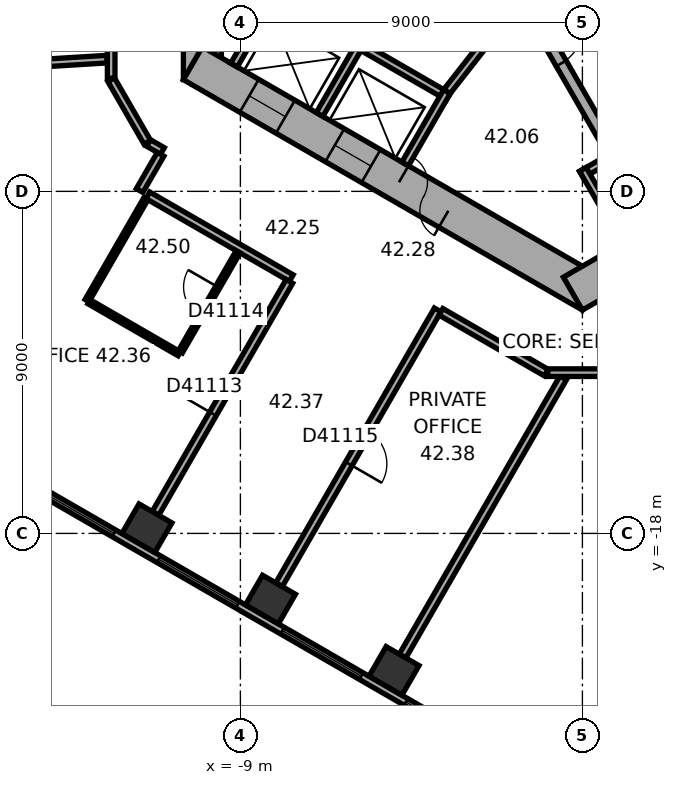
"""IFC4 building model, lengths in metres.
Left out: names, types, materials, properties, quantities, classifications, styles, units other than length and angle.
Written with IfcOpenShell. Run it as: python <this file> out.ifc"""

import sys

from ifc_helpers import new_model, si_unit, direction, frame, frame_2d, origin, origin_2d, place, context, subcontext, project, spatial, rectangle, extrude, element, fill, save


model = new_model("IFC4")
c1 = context("Model", 3, precision=1e-05, world=origin(), true_north=direction((0.0, 1.0)))
c2 = subcontext(c1, "Body", "Model", "MODEL_VIEW")
j1 = project(units=[si_unit("LENGTHUNIT", "METRE"), si_unit("PLANEANGLEUNIT", "RADIAN")], contexts=[c1])
p1 = place(None, origin())
s1 = spatial("IfcSite", under=j1, at=p1, CompositionType="ELEMENT")
p2 = place(p1, origin())
s2 = spatial("IfcBuilding", under=s1, at=p2, CompositionType="ELEMENT")
p3 = place(p2, frame((0.0, 0.0, 172.5)))
s3 = spatial("IfcBuildingStorey", under=s2, at=p3, CompositionType="ELEMENT", Elevation=172.5)
for number, where, z_axis, x_axis in (
    (1, (-11.46, -17.863, 0.0), (0.0, 0.0, 1.0), (0.866, -0.5, 0.0)),
    (2, (-8.208, -19.74, 0.0), (0.0, 0.0, 1.0), (0.866, -0.5, 0.0)),
    (3, (-4.958, -21.617, 0.0), (0.0, 0.0, 1.0), (0.866, -0.5, 0.0)),
):
    element("IfcColumn", number, at=place(p3, frame(where, z_axis=z_axis, x_axis=x_axis)), inside=s3, PredefinedType="COLUMN", context=c2, shape_type="SweptSolid", body=[
        extrude(rectangle(XDim=1.0, YDim=0.9, at=origin_2d()), origin(), (0.0, 0.0, 1.0), 3.7),
    ])
p4 = place(p3, frame((-10.0, 6.062, 0.0), z_axis=(0.0, 0.0, 1.0), x_axis=(0.0, -1.0, 0.0)))
e4 = element("IfcWall", 4, at=p4, inside=s3, PredefinedType="SHEAR", context=c2, shape_type="SweptSolid", body=[
    extrude(rectangle(XDim=12.125, YDim=1.0, at=frame_2d((6.062, 0.0))), origin(), (0.0, 0.0, 1.0), 3.7),
])
p5 = place(p4, frame((5.212, 0.0, 0.0)))
e5 = element("IfcOpeningElement", 5, at=p5, cuts=e4, PredefinedType="OPENING", context=c2, shape_type="SweptSolid", body=[
    extrude(rectangle(XDim=1.1, YDim=2.1, at=frame_2d((0.55, 1.05))), frame((0.0, 0.51, 0.0), z_axis=(0.0, -1.0, 0.0), x_axis=(1.0, 0.0, 0.0)), (0.0, 0.0, 1.0), 1.02),
])
p6 = place(p4, frame((7.812, 0.0, 0.0)))
e6 = element("IfcOpeningElement", 6, at=p6, cuts=e4, PredefinedType="OPENING", context=c2, shape_type="SweptSolid", body=[
    extrude(rectangle(XDim=1.1, YDim=2.1, at=frame_2d((0.55, 1.05))), frame((0.0, 0.51, 0.0), z_axis=(0.0, -1.0, 0.0), x_axis=(1.0, 0.0, 0.0)), (0.0, 0.0, 1.0), 1.02),
])
p7 = place(p3, frame((-10.25, -5.629, 0.0), z_axis=(0.0, 0.0, 1.0), x_axis=(0.866022616891, -0.50000482701, 0.0)))
e7 = element("IfcWall", 7, at=p7, inside=s3, PredefinedType="SHEAR", context=c2, shape_type="SweptSolid", body=[
    extrude(rectangle(XDim=12.125, YDim=1.0, at=frame_2d((6.062, 0.0))), origin(), (0.0, 0.0, 1.0), 3.7),
])
p8 = place(p7, frame((6.262, 0.0, 0.0)))
e8 = element("IfcOpeningElement", 8, at=p8, cuts=e7, PredefinedType="OPENING", context=c2, shape_type="SweptSolid", body=[
    extrude(rectangle(XDim=1.5, YDim=2.1, at=frame_2d((0.75, 1.05))), frame((0.0, 0.51, 0.0), z_axis=(0.0, -1.0, 0.0), x_axis=(1.0, 0.0, 0.0)), (0.0, 0.0, 1.0), 1.02),
])
p9 = place(p7, frame((1.712, 0.0, 0.0)))
e9 = element("IfcOpeningElement", 9, at=p9, cuts=e7, PredefinedType="OPENING", context=c2, shape_type="SweptSolid", body=[
    extrude(rectangle(XDim=1.1, YDim=2.1, at=frame_2d((0.55, 1.05))), frame((0.0, 0.51, 0.0), z_axis=(0.0, -1.0, 0.0), x_axis=(1.0, 0.0, 0.0)), (0.0, 0.0, 1.0), 1.02),
])
p10 = place(p7, frame((4.312, 0.0, 0.0)))
e10 = element("IfcOpeningElement", 10, at=p10, cuts=e7, PredefinedType="OPENING", context=c2, shape_type="SweptSolid", body=[
    extrude(rectangle(XDim=1.1, YDim=2.1, at=frame_2d((0.55, 1.05))), frame((0.0, 0.51, 0.0), z_axis=(0.0, -1.0, 0.0), x_axis=(1.0, 0.0, 0.0)), (0.0, 0.0, 1.0), 1.02),
])
p11 = place(p3, frame((-0.25, -11.691, 0.0), z_axis=(0.0, 0.0, 1.0), x_axis=(0.866022616891, 0.50000482701, 0.0)))
e11 = element("IfcWall", 11, at=p11, inside=s3, PredefinedType="SHEAR", context=c2, shape_type="SweptSolid", body=[
    extrude(rectangle(XDim=12.125, YDim=1.0, at=frame_2d((6.062, 0.0))), origin(), (0.0, 0.0, 1.0), 3.7),
])
p12 = place(p11, frame((2.612, 0.0, 0.0)))
e12 = element("IfcOpeningElement", 12, at=p12, cuts=e11, PredefinedType="OPENING", context=c2, shape_type="SweptSolid", body=[
    extrude(rectangle(XDim=1.1, YDim=2.1, at=frame_2d((0.55, 1.05))), frame((0.0, 0.51, 0.0), z_axis=(0.0, -1.0, 0.0), x_axis=(1.0, 0.0, 0.0)), (0.0, 0.0, 1.0), 1.02),
])
p13 = place(p11, frame((5.212, 0.0, 0.0)))
e13 = element("IfcOpeningElement", 13, at=p13, cuts=e11, PredefinedType="OPENING", context=c2, shape_type="SweptSolid", body=[
    extrude(rectangle(XDim=1.1, YDim=2.1, at=frame_2d((0.55, 1.05))), frame((0.0, 0.51, 0.0), z_axis=(0.0, -1.0, 0.0), x_axis=(1.0, 0.0, 0.0)), (0.0, 0.0, 1.0), 1.02),
])
p14 = place(p11, frame((7.812, 0.0, 0.0)))
e14 = element("IfcOpeningElement", 14, at=p14, cuts=e11, PredefinedType="OPENING", context=c2, shape_type="SweptSolid", body=[
    extrude(rectangle(XDim=1.1, YDim=2.1, at=frame_2d((0.55, 1.05))), frame((0.0, 0.51, 0.0), z_axis=(0.0, -1.0, 0.0), x_axis=(1.0, 0.0, 0.0)), (0.0, 0.0, 1.0), 1.02),
])
p15 = place(p3, frame((-18.789, -14.267, 0.0), z_axis=(0.0, 0.0, 1.0), x_axis=(0.866023315909, -0.500003616288, 0.0)))
e15 = element("IfcWall", 15, at=p15, inside=s3, PredefinedType="STANDARD", context=c2, shape_type="SweptSolid", body=[
    extrude(rectangle(XDim=20.044, YDim=0.2, at=frame_2d((10.022, 0.0))), origin(), (0.0, 0.0, 1.0), 3.7),
])
p16 = place(p15, frame((1.314, 0.0, 0.9)))
e16 = element("IfcOpeningElement", 16, at=p16, cuts=e15, PredefinedType="OPENING", context=c2, shape_type="SweptSolid", body=[
    extrude(rectangle(XDim=2.4, YDim=2.0, at=frame_2d((1.2, 1.0))), frame((0.0, 0.11, 0.0), z_axis=(0.0, -1.0, 0.0), x_axis=(1.0, 0.0, 0.0)), (0.0, 0.0, 1.0), 0.22),
])
p17 = place(p15, frame((5.069, 0.0, 0.9)))
e17 = element("IfcOpeningElement", 17, at=p17, cuts=e15, PredefinedType="OPENING", context=c2, shape_type="SweptSolid", body=[
    extrude(rectangle(XDim=2.4, YDim=2.0, at=frame_2d((1.2, 1.0))), frame((0.0, 0.11, 0.0), z_axis=(0.0, -1.0, 0.0), x_axis=(1.0, 0.0, 0.0)), (0.0, 0.0, 1.0), 0.22),
])
p18 = place(p15, frame((8.823, 0.0, 0.9)))
e18 = element("IfcOpeningElement", 18, at=p18, cuts=e15, PredefinedType="OPENING", context=c2, shape_type="SweptSolid", body=[
    extrude(rectangle(XDim=2.4, YDim=2.0, at=frame_2d((1.2, 1.0))), frame((0.0, 0.11, 0.0), z_axis=(0.0, -1.0, 0.0), x_axis=(1.0, 0.0, 0.0)), (0.0, 0.0, 1.0), 0.22),
])
p19 = place(p15, frame((12.577, 0.0, 0.9)))
e19 = element("IfcOpeningElement", 19, at=p19, cuts=e15, PredefinedType="OPENING", context=c2, shape_type="SweptSolid", body=[
    extrude(rectangle(XDim=2.4, YDim=2.0, at=frame_2d((1.2, 1.0))), frame((0.0, 0.11, 0.0), z_axis=(0.0, -1.0, 0.0), x_axis=(1.0, 0.0, 0.0)), (0.0, 0.0, 1.0), 0.22),
])
p20 = place(p15, frame((16.331, 0.0, 0.9)))
e20 = element("IfcOpeningElement", 20, at=p20, cuts=e15, PredefinedType="OPENING", context=c2, shape_type="SweptSolid", body=[
    extrude(rectangle(XDim=2.4, YDim=2.0, at=frame_2d((1.2, 1.0))), frame((0.0, 0.11, 0.0), z_axis=(0.0, -1.0, 0.0), x_axis=(1.0, 0.0, 0.0)), (0.0, 0.0, 1.0), 0.22),
])
p21 = place(p3, frame((-8.203, -3.809, 0.0), z_axis=(0.0, 0.0, 1.0), x_axis=(0.866028230842, -0.499995103361, 0.0)))
e21 = element("IfcWall", 21, at=p21, inside=s3, PredefinedType="PARTITIONING", context=c2, shape_type="SweptSolid", body=[
    extrude(rectangle(XDim=5.4, YDim=0.2, at=frame_2d((2.7, 0.0))), origin(), (0.0, 0.0, 1.0), 3.42),
])
for number, where, z_axis, x_axis in (
    (22, (-8.067, -3.772, 0.0), (0.0, 0.0, 1.0), (-0.5, -0.866, 0.0)),
    (23, (-5.815, -5.072, 0.0), (0.0, 0.0, 1.0), (-0.5, -0.866, 0.0)),
):
    element("IfcWall", number, at=place(p3, frame(where, z_axis=z_axis, x_axis=x_axis)), inside=s3, PredefinedType="PARTITIONING", context=c2, shape_type="SweptSolid", body=[
        extrude(rectangle(XDim=2.2, YDim=0.2, at=frame_2d((1.1, 0.0))), origin(), (0.0, 0.0, 1.0), 3.42),
    ])
p22 = place(p3, frame((-3.563, -6.372, 0.0), z_axis=(0.0, 0.0, 1.0), x_axis=(-0.499994660107, -0.866028486751, 0.0)))
e24 = element("IfcWall", 24, at=p22, inside=s3, PredefinedType="PARTITIONING", context=c2, shape_type="SweptSolid", body=[
    extrude(rectangle(XDim=2.2, YDim=0.2, at=frame_2d((1.1, 0.0))), origin(), (0.0, 0.0, 1.0), 3.42),
])
p23 = place(p3, frame((-0.024, -8.559, 0.0), z_axis=(0.0, 0.0, 1.0), x_axis=(0.866026010844, 0.49999894854, 0.0)))
e25 = element("IfcWall", 25, at=p23, inside=s3, PredefinedType="PARTITIONING", context=c2, shape_type="SweptSolid", body=[
    extrude(rectangle(XDim=8.0, YDim=0.2, at=frame_2d((4.0, 0.0))), origin(), (0.0, 0.0, 1.0), 3.42),
])
p24 = place(p3, frame((0.013, -8.422, 0.0), z_axis=(0.0, 0.0, 1.0), x_axis=(0.500077893725, -0.86598042715, 0.0)))
e26 = element("IfcWall", 26, at=p24, inside=s3, PredefinedType="PARTITIONING", context=c2, shape_type="SweptSolid", body=[
    extrude(rectangle(XDim=2.2, YDim=0.2, at=frame_2d((1.1, 0.0))), origin(), (0.0, 0.0, 1.0), 3.42),
])
p25 = place(p3, frame((-1.558, -3.902, 0.0), z_axis=(0.0, 0.0, 1.0), x_axis=(0.499977259774, -0.866038532462, 0.0)))
e27 = element("IfcWall", 27, at=p25, inside=s3, PredefinedType="SHEAR", context=c2, shape_type="SweptSolid", body=[
    extrude(rectangle(XDim=4.7, YDim=0.3, at=frame_2d((2.35, 0.0))), origin(), (0.0, 0.0, 1.0), 3.42),
])
p26 = place(p25, frame((0.8, 0.0, 0.0)))
e28 = element("IfcOpeningElement", 28, at=p26, cuts=e27, PredefinedType="OPENING", context=c2, shape_type="SweptSolid", body=[
    extrude(rectangle(XDim=1.2, YDim=2.1, at=frame_2d((0.6, 1.05))), frame((0.0, 0.16, 0.0), z_axis=(0.0, -1.0, 0.0), x_axis=(1.0, 0.0, 0.0)), (0.0, 0.0, 1.0), 0.32),
])
p27 = place(p3, frame((-1.712, -4.008, 0.0), z_axis=(0.0, 0.0, 1.0), x_axis=(-0.616549420702, -0.787316208287, 0.0)))
e29 = element("IfcWall", 29, at=p27, inside=s3, PredefinedType="PARTITIONING", context=c2, shape_type="SweptSolid", body=[
    extrude(rectangle(XDim=3.002, YDim=0.2, at=frame_2d((1.501, 0.0))), origin(), (0.0, 0.0, 1.0), 3.42),
])
p28 = place(p3, frame((-20.421, -6.005, 0.0), z_axis=(0.0, 0.0, 1.0), x_axis=(0.998134865741, 0.061047438866, 0.0)))
e30 = element("IfcWall", 30, at=p28, inside=s3, PredefinedType="PARTITIONING", context=c2, shape_type="SweptSolid", body=[
    extrude(rectangle(XDim=7.927, YDim=0.2, at=frame_2d((3.963, 0.0))), origin(), (0.0, 0.0, 1.0), 2.87),
])
p29 = place(p3, frame((-13.035, -11.875, 0.0), z_axis=(0.0, 0.0, 1.0), x_axis=(0.500026960575, 0.86600983753, 0.0)))
e31 = element("IfcWall", 31, at=p29, inside=s3, PredefinedType="PARTITIONING", context=c2, shape_type="SweptSolid", body=[
    extrude(rectangle(XDim=3.1, YDim=0.12, at=frame_2d((1.55, 0.0))), origin(), (0.0, 0.0, 1.0), 3.42),
])
p30 = place(p3, frame((-12.4, -6.062, 0.0), z_axis=(0.0, 0.0, 1.0), x_axis=(0.500022797313, -0.86601224135, 0.0)))
e32 = element("IfcWall", 32, at=p30, inside=s3, PredefinedType="PARTITIONING", context=c2, shape_type="SweptSolid", body=[
    extrude(rectangle(XDim=1.9, YDim=0.2, at=frame_2d((0.95, 0.0))), origin(), (0.0, 0.0, 1.0), 3.42),
])
p31 = place(p3, frame((-12.4, -4.201, 0.0), z_axis=(0.0, 0.0, 1.0), x_axis=(0.0, -1.0, 0.0)))
e33 = element("IfcWall", 33, at=p31, inside=s3, PredefinedType="PARTITIONING", context=c2, shape_type="SweptSolid", body=[
    extrude(rectangle(XDim=1.821, YDim=0.2, at=frame_2d((0.911, 0.0))), origin(), (0.0, 0.0, 1.0), 3.42),
])
p32 = place(p3, frame((-11.435, -9.103, 0.0), z_axis=(0.0, 0.0, 1.0), x_axis=(0.866007399799, -0.500031182522, 0.0)))
e34 = element("IfcWall", 34, at=p32, inside=s3, PredefinedType="PARTITIONING", context=c2, shape_type="SweptSolid", body=[
    extrude(rectangle(XDim=4.358, YDim=0.2, at=frame_2d((2.179, 0.0))), origin(), (0.0, 0.0, 1.0), 3.42),
])
p33 = place(p3, frame((-11.415, -7.728, 0.0), z_axis=(0.0, 0.0, 1.0), x_axis=(0.865915281873, -0.500190688257, 0.0)))
e35 = element("IfcWall", 35, at=p33, inside=s3, PredefinedType="PARTITIONING", context=c2, shape_type="SweptSolid", body=[
    extrude(rectangle(XDim=0.421, YDim=0.2, at=frame_2d((0.21, 0.0))), origin(), (0.0, 0.0, 1.0), 3.42),
])
p34 = place(p3, frame((-11.235, -17.474, 0.0), z_axis=(0.0, 0.0, 1.0), x_axis=(0.500009260695, 0.866020057054, 0.0)))
e36 = element("IfcWall", 36, at=p34, inside=s3, PredefinedType="PARTITIONING", context=c2, shape_type="SweptSolid", body=[
    extrude(rectangle(XDim=7.049, YDim=0.2, at=frame_2d((3.524, 0.0))), origin(), (0.0, 0.0, 1.0), 2.87),
])
p35 = place(p34, frame((3.024, 0.0, 0.0)))
e37 = element("IfcOpeningElement", 37, at=p35, cuts=e36, PredefinedType="OPENING", context=c2, shape_type="SweptSolid", body=[
    extrude(rectangle(XDim=1.0, YDim=2.1, at=frame_2d((0.5, 1.05))), frame((0.0, 0.11, 0.0), z_axis=(0.0, -1.0, 0.0), x_axis=(1.0, 0.0, 0.0)), (0.0, 0.0, 1.0), 0.22),
])
p36 = place(p3, frame((-11.101, -8.025, 0.0), z_axis=(0.0, 0.0, 1.0), x_axis=(-0.500074377092, -0.865982457891, 0.0)))
e38 = element("IfcWall", 38, at=p36, inside=s3, PredefinedType="PARTITIONING", context=c2, shape_type="SweptSolid", body=[
    extrude(rectangle(XDim=1.101, YDim=0.2, at=frame_2d((0.55, 0.0))), origin(), (0.0, 0.0, 1.0), 3.42),
])
p37 = place(p3, frame((-10.61, -13.275, 0.0), z_axis=(0.0, 0.0, 1.0), x_axis=(-0.866019409031, 0.500010383074, 0.0)))
e39 = element("IfcWall", 39, at=p37, inside=s3, PredefinedType="PARTITIONING", context=c2, shape_type="SweptSolid", body=[
    extrude(rectangle(XDim=2.74, YDim=0.12, at=frame_2d((1.37, 0.0))), origin(), (0.0, 0.0, 1.0), 3.42),
])
p38 = place(p3, frame((-9.06, -10.59, 0.0), z_axis=(0.0, 0.0, 1.0), x_axis=(-0.49993101378, -0.866065229334, 0.0)))
e40 = element("IfcWall", 40, at=p38, inside=s3, PredefinedType="PARTITIONING", context=c2, shape_type="SweptSolid", body=[
    extrude(rectangle(XDim=3.04, YDim=0.12, at=frame_2d((1.52, 0.0))), origin(), (0.0, 0.0, 1.0), 3.42),
])
p39 = place(p38, frame((1.07, 0.0, 0.0)))
e41 = element("IfcOpeningElement", 41, at=p39, cuts=e40, PredefinedType="OPENING", context=c2, shape_type="SweptSolid", body=[
    extrude(rectangle(XDim=0.9, YDim=2.1, at=frame_2d((0.45, 1.05))), frame((0.0, 0.07, 0.0), z_axis=(0.0, -1.0, 0.0), x_axis=(1.0, 0.0, 0.0)), (0.0, 0.0, 1.0), 0.14),
])
p40 = place(p3, frame((-7.984, -19.351, 0.0), z_axis=(0.0, 0.0, 1.0), x_axis=(0.500010139422, 0.866019549707, 0.0)))
e42 = element("IfcWall", 42, at=p40, inside=s3, PredefinedType="PARTITIONING", context=c2, shape_type="SweptSolid", body=[
    extrude(rectangle(XDim=8.35, YDim=0.2, at=frame_2d((4.175, 0.0))), origin(), (0.0, 0.0, 1.0), 3.42),
])
p41 = place(p40, frame((3.675, 0.0, 0.0)))
e43 = element("IfcOpeningElement", 43, at=p41, cuts=e42, PredefinedType="OPENING", context=c2, shape_type="SweptSolid", body=[
    extrude(rectangle(XDim=1.0, YDim=2.1, at=frame_2d((0.5, 1.05))), frame((0.0, 0.11, 0.0), z_axis=(0.0, -1.0, 0.0), x_axis=(1.0, 0.0, 0.0)), (0.0, 0.0, 1.0), 0.22),
])
p42 = place(p3, frame((-4.732, -21.228, 0.0), z_axis=(0.0, 0.0, 1.0), x_axis=(0.500000843414, 0.866024916838, 0.0)))
e44 = element("IfcWall", 44, at=p42, inside=s3, PredefinedType="PARTITIONING", context=c2, shape_type="SweptSolid", body=[
    extrude(rectangle(XDim=8.452, YDim=0.2, at=frame_2d((4.226, 0.0))), origin(), (0.0, 0.0, 1.0), 3.42),
])
p43 = place(p3, frame((-3.722, -12.169, 0.0), z_axis=(0.0, 0.0, 1.0), x_axis=(0.866033163891, -0.499986558861, 0.0)))
e45 = element("IfcWall", 45, at=p43, inside=s3, PredefinedType="PARTITIONING", context=c2, shape_type="SweptSolid", body=[
    extrude(rectangle(XDim=3.201, YDim=0.2, at=frame_2d((1.6, 0.0))), origin(), (0.0, 0.0, 1.0), 3.42),
])
p44 = place(p3, frame((-0.91, -13.77, 0.0), z_axis=(0.0, 0.0, 1.0), x_axis=(1.0, 0.0, 0.0)))
e46 = element("IfcWall", 46, at=p44, inside=s3, PredefinedType="PARTITIONING", context=c2, shape_type="SweptSolid", body=[
    extrude(rectangle(XDim=1.86, YDim=0.2, at=frame_2d((0.93, 0.0))), origin(), (0.0, 0.0, 1.0), 3.42),
])
p45 = place(p17, origin())
e47 = element("IfcWindow", 47, at=p45, inside=s3, PartitioningType="SINGLE_PANEL", PredefinedType="WINDOW", context=c2, shape_type="SweptSolid", body=[
    extrude(rectangle(XDim=2.4, YDim=2.0, at=frame_2d((1.2, 1.0))), frame((0.0, 0.03, 0.0), z_axis=(0.0, -1.0, 0.0), x_axis=(1.0, 0.0, 0.0)), (0.0, 0.0, 1.0), 0.06),
])
fill(e17, e47)
p46 = place(p18, origin())
e48 = element("IfcWindow", 48, at=p46, inside=s3, PartitioningType="SINGLE_PANEL", PredefinedType="WINDOW", context=c2, shape_type="SweptSolid", body=[
    extrude(rectangle(XDim=2.4, YDim=2.0, at=frame_2d((1.2, 1.0))), frame((0.0, 0.03, 0.0), z_axis=(0.0, -1.0, 0.0), x_axis=(1.0, 0.0, 0.0)), (0.0, 0.0, 1.0), 0.06),
])
fill(e18, e48)
p47 = place(p19, origin())
e49 = element("IfcWindow", 49, at=p47, inside=s3, PartitioningType="SINGLE_PANEL", PredefinedType="WINDOW", context=c2, shape_type="SweptSolid", body=[
    extrude(rectangle(XDim=2.4, YDim=2.0, at=frame_2d((1.2, 1.0))), frame((0.0, 0.03, 0.0), z_axis=(0.0, -1.0, 0.0), x_axis=(1.0, 0.0, 0.0)), (0.0, 0.0, 1.0), 0.06),
])
fill(e19, e49)
p48 = place(p20, origin())
e50 = element("IfcWindow", 50, at=p48, inside=s3, PartitioningType="SINGLE_PANEL", PredefinedType="WINDOW", context=c2, shape_type="SweptSolid", body=[
    extrude(rectangle(XDim=2.4, YDim=2.0, at=frame_2d((1.2, 1.0))), frame((0.0, 0.03, 0.0), z_axis=(0.0, -1.0, 0.0), x_axis=(1.0, 0.0, 0.0)), (0.0, 0.0, 1.0), 0.06),
])
fill(e20, e50)
p49 = place(p8, origin())
e51 = element("IfcDoor", 51, at=p49, inside=s3, OperationType="DOUBLE_DOOR_SINGLE_SWING", PredefinedType="DOOR", context=c2, shape_type="SweptSolid", body=[
    extrude(rectangle(XDim=1.5, YDim=2.1, at=frame_2d((0.75, 1.05))), frame((0.0, 0.025, 0.0), z_axis=(0.0, -1.0, 0.0), x_axis=(1.0, 0.0, 0.0)), (0.0, 0.0, 1.0), 0.05),
])
fill(e8, e51)
p50 = place(p26, origin())
e52 = element("IfcDoor", 52, at=p50, inside=s3, OperationType="SINGLE_SWING_RIGHT", PredefinedType="DOOR", context=c2, shape_type="SweptSolid", body=[
    extrude(rectangle(XDim=1.2, YDim=2.1, at=frame_2d((0.6, 1.05))), frame((0.0, 0.025, 0.0), z_axis=(0.0, -1.0, 0.0), x_axis=(1.0, 0.0, 0.0)), (0.0, 0.0, 1.0), 0.05),
])
fill(e28, e52)
p51 = place(p9, origin())
e53 = element("IfcDoor", 53, at=p51, inside=s3, OperationType="DOUBLE_DOOR_SLIDING", PredefinedType="DOOR", context=c2, shape_type="SweptSolid", body=[
    extrude(rectangle(XDim=1.1, YDim=2.1, at=frame_2d((0.55, 1.05))), frame((0.0, 0.025, 0.0), z_axis=(0.0, -1.0, 0.0), x_axis=(1.0, 0.0, 0.0)), (0.0, 0.0, 1.0), 0.05),
])
fill(e9, e53)
p52 = place(p10, origin())
e54 = element("IfcDoor", 54, at=p52, inside=s3, OperationType="DOUBLE_DOOR_SLIDING", PredefinedType="DOOR", context=c2, shape_type="SweptSolid", body=[
    extrude(rectangle(XDim=1.1, YDim=2.1, at=frame_2d((0.55, 1.05))), frame((0.0, 0.025, 0.0), z_axis=(0.0, -1.0, 0.0), x_axis=(1.0, 0.0, 0.0)), (0.0, 0.0, 1.0), 0.05),
])
fill(e10, e54)
p53 = place(p35, origin())
e55 = element("IfcDoor", 55, at=p53, inside=s3, OperationType="SINGLE_SWING_LEFT", PredefinedType="DOOR", context=c2, shape_type="SweptSolid", body=[
    extrude(rectangle(XDim=1.0, YDim=2.1, at=frame_2d((0.5, 1.05))), frame((0.0, 0.025, 0.0), z_axis=(0.0, -1.0, 0.0), x_axis=(1.0, 0.0, 0.0)), (0.0, 0.0, 1.0), 0.05),
])
fill(e37, e55)
p54 = place(p39, origin())
e56 = element("IfcDoor", 56, at=p54, inside=s3, OperationType="SINGLE_SWING_LEFT", PredefinedType="DOOR", context=c2, shape_type="SweptSolid", body=[
    extrude(rectangle(XDim=0.9, YDim=2.1, at=frame_2d((0.45, 1.05))), frame((0.0, 0.025, 0.0), z_axis=(0.0, -1.0, 0.0), x_axis=(1.0, 0.0, 0.0)), (0.0, 0.0, 1.0), 0.05),
])
fill(e41, e56)
p55 = place(p41, origin())
e57 = element("IfcDoor", 57, at=p55, inside=s3, OperationType="SINGLE_SWING_LEFT", PredefinedType="DOOR", context=c2, shape_type="SweptSolid", body=[
    extrude(rectangle(XDim=1.0, YDim=2.1, at=frame_2d((0.5, 1.05))), frame((0.0, 0.025, 0.0), z_axis=(0.0, -1.0, 0.0), x_axis=(1.0, 0.0, 0.0)), (0.0, 0.0, 1.0), 0.05),
])
fill(e43, e57)
save(model, sys.argv[1])
